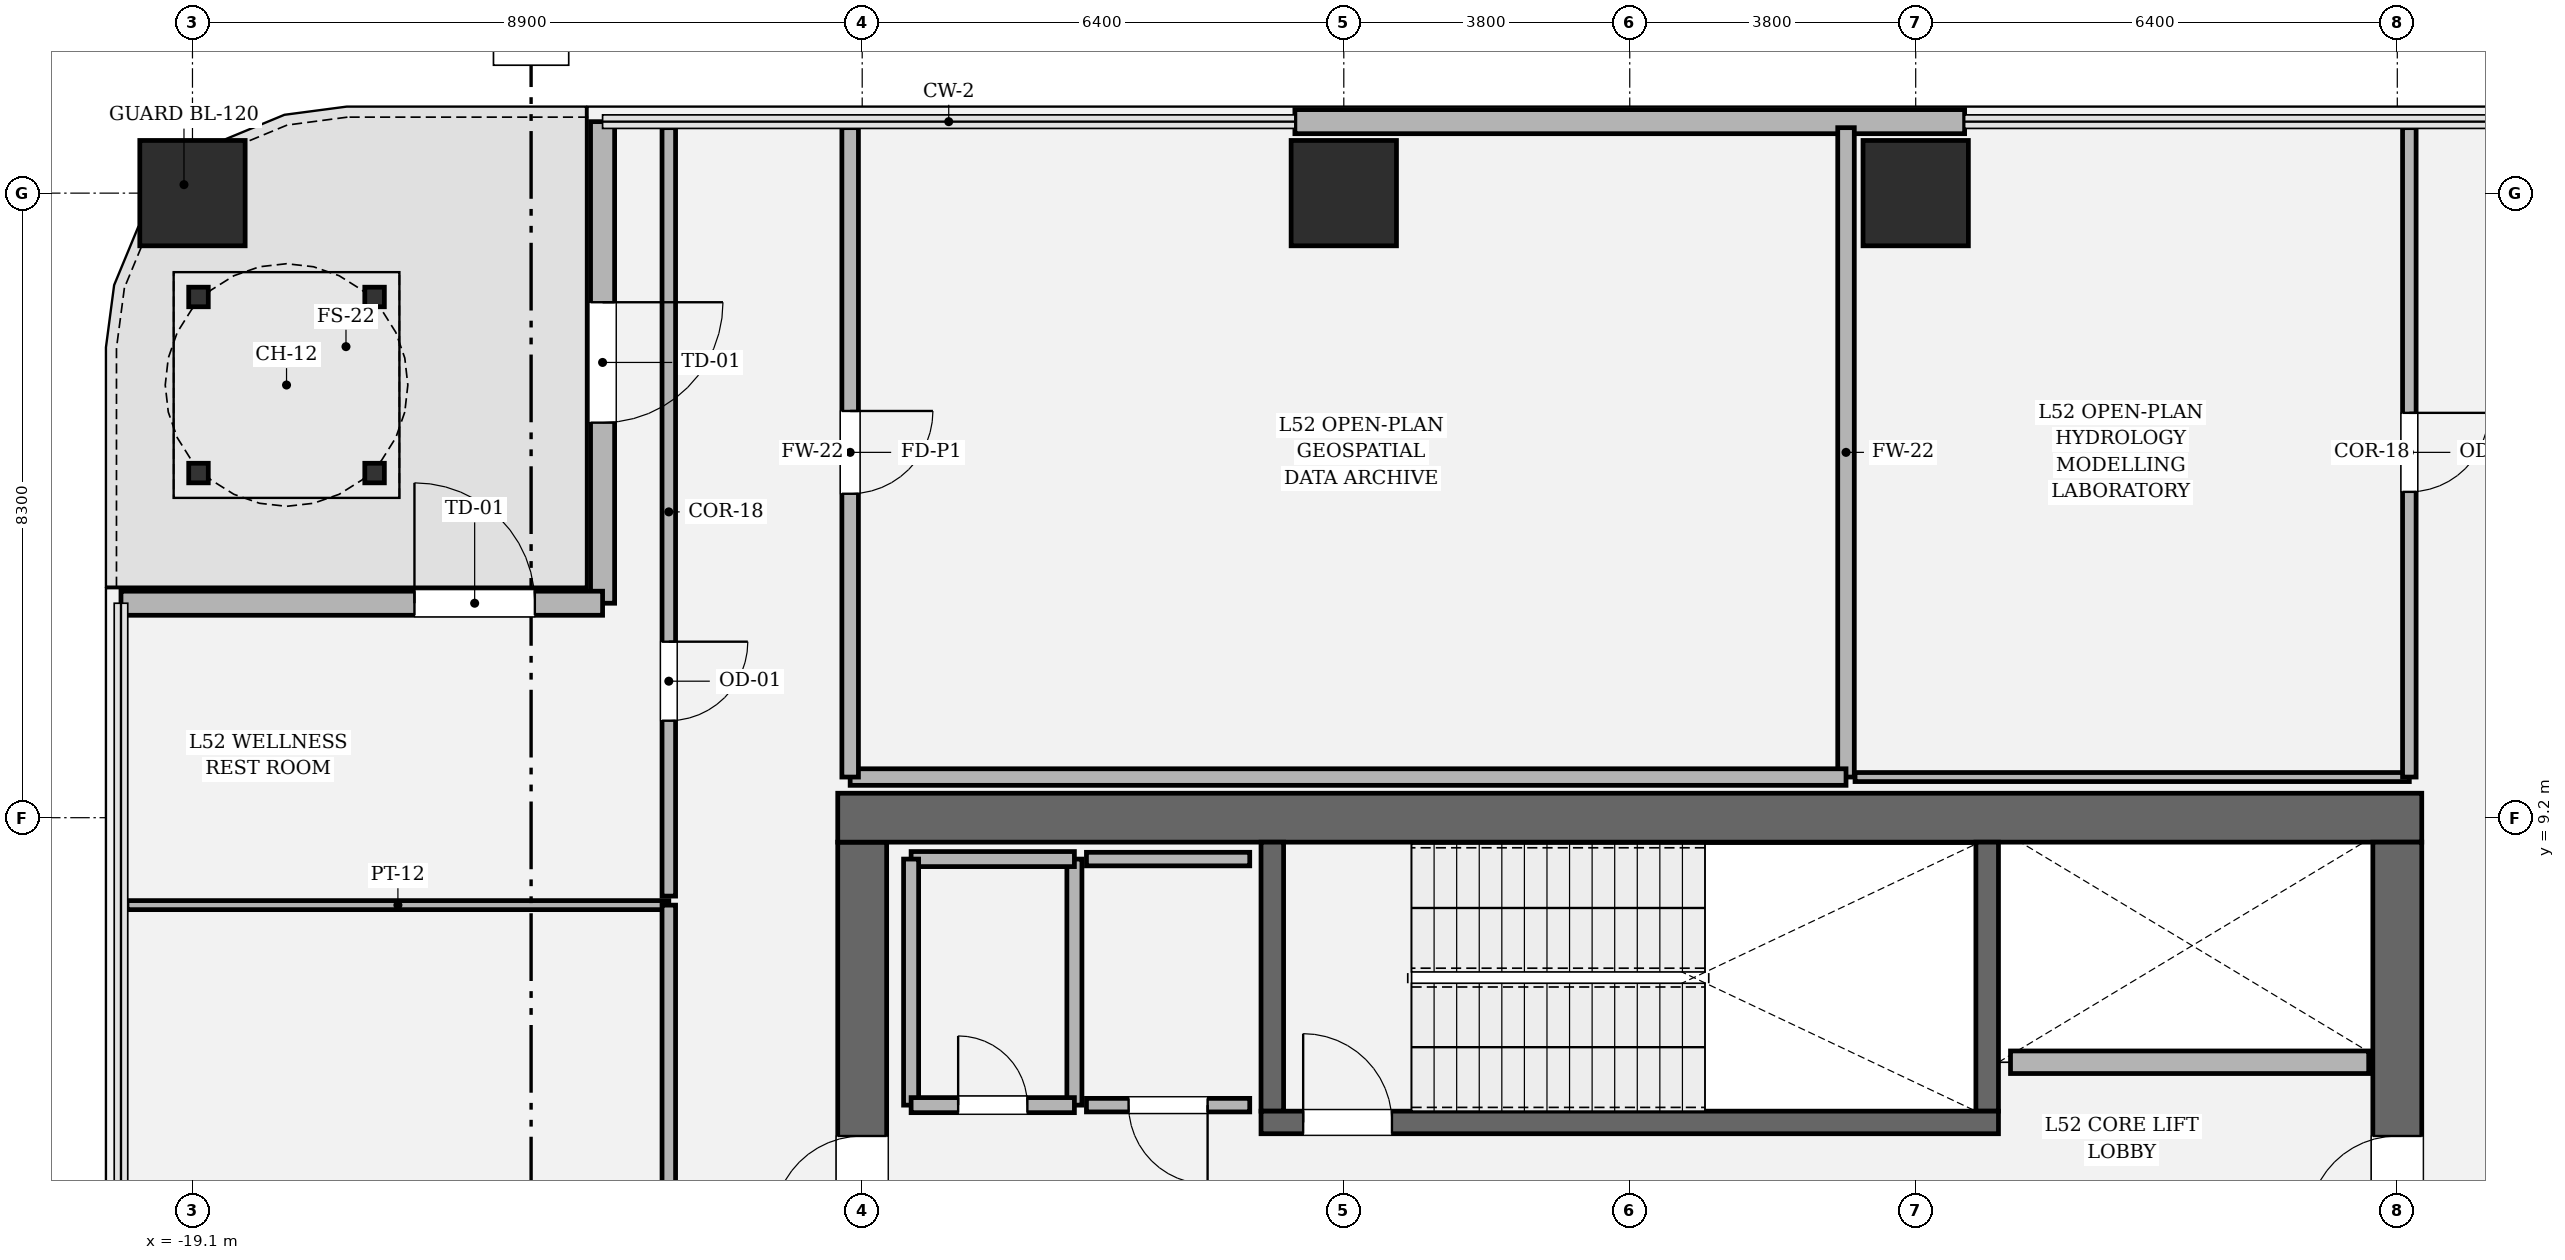
"""IFC4 building model, lengths in metres.
Left out: names, types, materials, properties, quantities, classifications, styles, units other than length and angle.
Written with IfcOpenShell. Run it as: python <this file> out.ifc"""

import sys

from ifc_helpers import new_model, si_unit, direction, frame, frame_2d, origin, origin_2d, place, context, subcontext, project, spatial, rectangle, hollow_rectangle, extrude, element, fill, save


model = new_model("IFC4")
c1 = context("Model", 3, precision=1e-05, world=origin(), true_north=direction((0.0, 1.0)))
c2 = subcontext(c1, "Body", "Model", "MODEL_VIEW")
j1 = project(units=[si_unit("LENGTHUNIT", "METRE"), si_unit("PLANEANGLEUNIT", "RADIAN")], contexts=[c1])
p1 = place(None, origin())
s1 = spatial("IfcSite", under=j1, at=p1, CompositionType="ELEMENT")
p2 = place(p1, origin())
s2 = spatial("IfcBuilding", under=s1, at=p2, CompositionType="ELEMENT")
p3 = place(p2, frame((0.0, 0.0, 220.8)))
s3 = spatial("IfcBuildingStorey", under=s2, at=p3, CompositionType="ELEMENT", Elevation=220.8)
p4 = place(p3, frame((-10.2, -8.875, 0.0), z_axis=(0.0, 0.0, 1.0), x_axis=(0.0, 1.0, 0.0)))
e1 = element("IfcWall", 1, at=p4, inside=s3, PredefinedType="SHEAR", context=c2, shape_type="SweptSolid", body=[
    extrude(rectangle(XDim=17.75, YDim=0.65, at=frame_2d((8.875, 0.0))), origin(), (0.0, 0.0, 1.0), 4.05),
])
p5 = place(p4, frame((12.665, 0.0, 0.0)))
e2 = element("IfcOpeningElement", 2, at=p5, cuts=e1, PredefinedType="OPENING", context=c2, shape_type="SweptSolid", body=[
    extrude(rectangle(XDim=1.18, YDim=2.2, at=frame_2d((0.59, 1.1))), frame((0.0, 0.335, 0.0), z_axis=(0.0, -1.0, 0.0), x_axis=(1.0, 0.0, 0.0)), (0.0, 0.0, 1.0), 0.67),
])
p6 = place(p3, frame((-10.525, 9.2, 0.0), z_axis=(0.0, 0.0, 1.0), x_axis=(1.0, 0.0, 0.0)))
e3 = element("IfcWall", 3, at=p6, inside=s3, PredefinedType="SHEAR", context=c2, shape_type="SweptSolid", body=[
    extrude(rectangle(XDim=21.05, YDim=0.65, at=frame_2d((10.525, 0.0))), origin(), (0.0, 0.0, 1.0), 4.05),
])
p7 = place(p3, frame((10.2, 8.875, 0.0), z_axis=(0.0, 0.0, 1.0), x_axis=(0.0, -1.0, 0.0)))
e4 = element("IfcWall", 4, at=p7, inside=s3, PredefinedType="SHEAR", context=c2, shape_type="SweptSolid", body=[
    extrude(rectangle(XDim=17.75, YDim=0.65, at=frame_2d((8.875, 0.0))), origin(), (0.0, 0.0, 1.0), 4.05),
])
p8 = place(p7, frame((3.905, 0.0, 0.0)))
e5 = element("IfcOpeningElement", 5, at=p8, cuts=e4, PredefinedType="OPENING", context=c2, shape_type="SweptSolid", body=[
    extrude(rectangle(XDim=1.18, YDim=2.2, at=frame_2d((0.59, 1.1))), frame((0.0, 0.335, 0.0), z_axis=(0.0, -1.0, 0.0), x_axis=(1.0, 0.0, 0.0)), (0.0, 0.0, 1.0), 0.67),
])
for number, where, z_axis, x_axis in (
    (6, (-4.75, 5.3, 0.0), (0.0, 0.0, 1.0), (0.0, 1.0, 0.0)),
    (7, (4.75, 8.875, 0.0), (0.0, 0.0, 1.0), (0.0, -1.0, 0.0)),
):
    element("IfcWall", number, at=place(p3, frame(where, z_axis=z_axis, x_axis=x_axis)), inside=s3, PredefinedType="SOLIDWALL", context=c2, shape_type="SweptSolid", body=[
        extrude(rectangle(XDim=3.575, YDim=0.3, at=frame_2d((1.788, 0.0))), origin(), (0.0, 0.0, 1.0), 4.05),
    ])
p9 = place(p3, frame((-4.9, 5.15, 0.0), z_axis=(0.0, 0.0, 1.0), x_axis=(1.0, 0.0, 0.0)))
e8 = element("IfcWall", 8, at=p9, inside=s3, PredefinedType="SOLIDWALL", context=c2, shape_type="SweptSolid", body=[
    extrude(rectangle(XDim=9.8, YDim=0.3, at=frame_2d((4.9, 0.0))), origin(), (0.0, 0.0, 1.0), 4.05),
])
p10 = place(p9, frame((0.56, 0.0, 0.0)))
e9 = element("IfcOpeningElement", 9, at=p10, cuts=e8, PredefinedType="OPENING", context=c2, shape_type="SweptSolid", body=[
    extrude(rectangle(XDim=1.18, YDim=2.2, at=frame_2d((0.59, 1.1))), frame((0.0, 0.16, 0.0), z_axis=(0.0, -1.0, 0.0), x_axis=(1.0, 0.0, 0.0)), (0.0, 0.0, 1.0), 0.32),
])
for number, where, z_axis, x_axis in (
    (10, (3.8, 17.5, 0.0), (0.0, 0.0, 1.0), (1.0, 0.0, 0.0)),
    (11, (-3.8, 17.5, 0.0), (0.0, 0.0, 1.0), (1.0, 0.0, 0.0)),
    (12, (-19.1, 17.5, 0.0), (0.0, 0.0, 1.0), (1.0, 0.0, 0.0)),
):
    element("IfcColumn", number, at=place(p3, frame(where, z_axis=z_axis, x_axis=x_axis)), inside=s3, PredefinedType="COLUMN", context=c2, shape_type="SweptSolid", body=[
        extrude(hollow_rectangle(XDim=1.4, YDim=1.4, WallThickness=0.042, at=origin_2d()), origin(), (0.0, 0.0, 1.0), 4.05),
    ])
p11 = place(p3, frame((4.45, 18.45, 0.0), z_axis=(0.0, 0.0, 1.0), x_axis=(-1.0, 0.0, 0.0)))
e13 = element("IfcWall", 13, at=p11, inside=s3, PredefinedType="SOLIDWALL", context=c2, shape_type="SweptSolid", body=[
    extrude(rectangle(XDim=8.9, YDim=0.32, at=frame_2d((4.45, 0.0))), origin(), (0.0, 0.0, 1.0), 3.83),
])
p12 = place(p3, frame((-13.65, 18.45, 0.0), z_axis=(0.0, 0.0, 1.0), x_axis=(0.0, -1.0, 0.0)))
e14 = element("IfcWall", 14, at=p12, inside=s3, PredefinedType="SOLIDWALL", context=c2, shape_type="SweptSolid", body=[
    extrude(rectangle(XDim=6.4, YDim=0.32, at=frame_2d((3.2, 0.0))), origin(), (0.0, 0.0, 1.0), 3.174),
])
p13 = place(p12, frame((2.4, 0.0, 0.0)))
e15 = element("IfcOpeningElement", 15, at=p13, cuts=e14, PredefinedType="OPENING", context=c2, shape_type="SweptSolid", body=[
    extrude(rectangle(XDim=1.6, YDim=2.35, at=frame_2d((0.8, 1.175))), frame((0.0, 0.17, 0.0), z_axis=(0.0, -1.0, 0.0), x_axis=(1.0, 0.0, 0.0)), (0.0, 0.0, 1.0), 0.34),
])
p14 = place(p3, frame((-13.65, 12.05, 0.0), z_axis=(0.0, 0.0, 1.0), x_axis=(-1.0, 0.0, 0.0)))
e16 = element("IfcWall", 16, at=p14, inside=s3, PredefinedType="SOLIDWALL", context=c2, shape_type="SweptSolid", body=[
    extrude(rectangle(XDim=6.4, YDim=0.32, at=frame_2d((3.2, 0.0))), origin(), (0.0, 0.0, 1.0), 3.174),
])
p15 = place(p14, frame((0.9, 0.0, 0.0)))
e17 = element("IfcOpeningElement", 17, at=p15, cuts=e16, PredefinedType="OPENING", context=c2, shape_type="SweptSolid", body=[
    extrude(rectangle(XDim=1.6, YDim=2.35, at=frame_2d((0.8, 1.175))), frame((0.0, 0.17, 0.0), z_axis=(0.0, -1.0, 0.0), x_axis=(1.0, 0.0, 0.0)), (0.0, 0.0, 1.0), 0.34),
])
p16 = place(p3, frame((5.06, 5.95, 0.0), z_axis=(0.0, 0.0, 1.0), x_axis=(1.0, 0.0, 0.0)))
e18 = element("IfcWall", 18, at=p16, inside=s3, PredefinedType="SOLIDWALL", context=c2, shape_type="SweptSolid", body=[
    extrude(rectangle(XDim=4.76, YDim=0.3, at=frame_2d((2.38, 0.0))), origin(), (0.0, 0.0, 1.0), 3.83),
])
p17 = place(p3, frame((-7.38, 5.38, 0.0), z_axis=(0.0, 0.0, 1.0), x_axis=(0.0, 1.0, 0.0)))
e19 = element("IfcWall", 19, at=p17, inside=s3, PredefinedType="SOLIDWALL", context=c2, shape_type="SweptSolid", body=[
    extrude(rectangle(XDim=3.27, YDim=0.2, at=frame_2d((1.635, 0.0))), origin(), (0.0, 0.0, 1.0), 3.83),
])
p18 = place(p3, frame((-7.38, 8.65, 0.0), z_axis=(0.0, 0.0, 1.0), x_axis=(-1.0, 0.0, 0.0)))
e20 = element("IfcWall", 20, at=p18, inside=s3, PredefinedType="SOLIDWALL", context=c2, shape_type="SweptSolid", body=[
    extrude(rectangle(XDim=2.17, YDim=0.2, at=frame_2d((1.085, 0.0))), origin(), (0.0, 0.0, 1.0), 3.83),
])
p19 = place(p3, frame((-9.55, 8.65, 0.0), z_axis=(0.0, 0.0, 1.0), x_axis=(0.0, -1.0, 0.0)))
e21 = element("IfcWall", 21, at=p19, inside=s3, PredefinedType="SOLIDWALL", context=c2, shape_type="SweptSolid", body=[
    extrude(rectangle(XDim=3.27, YDim=0.2, at=frame_2d((1.635, 0.0))), origin(), (0.0, 0.0, 1.0), 3.83),
])
p20 = place(p3, frame((-9.55, 5.38, 0.0), z_axis=(0.0, 0.0, 1.0), x_axis=(1.0, 0.0, 0.0)))
e22 = element("IfcWall", 22, at=p20, inside=s3, PredefinedType="SOLIDWALL", context=c2, shape_type="SweptSolid", body=[
    extrude(rectangle(XDim=2.17, YDim=0.2, at=frame_2d((1.085, 0.0))), origin(), (0.0, 0.0, 1.0), 3.83),
])
p21 = place(p20, frame((0.625, 0.0, 0.0)))
e23 = element("IfcOpeningElement", 23, at=p21, cuts=e22, PredefinedType="OPENING", context=c2, shape_type="SweptSolid", body=[
    extrude(rectangle(XDim=0.92, YDim=2.1, at=frame_2d((0.46, 1.05))), frame((0.0, 0.11, 0.0), z_axis=(0.0, -1.0, 0.0), x_axis=(1.0, 0.0, 0.0)), (0.0, 0.0, 1.0), 0.22),
])
p22 = place(p3, frame((-5.05, 8.65, 0.0), z_axis=(0.0, 0.0, 1.0), x_axis=(-1.0, 0.0, 0.0)))
e24 = element("IfcWall", 24, at=p22, inside=s3, PredefinedType="PARTITIONING", context=c2, shape_type="SweptSolid", body=[
    extrude(rectangle(XDim=2.17, YDim=0.18, at=frame_2d((1.085, 0.0))), origin(), (0.0, 0.0, 1.0), 3.83),
])
p23 = place(p3, frame((-7.22, 5.38, 0.0), z_axis=(0.0, 0.0, 1.0), x_axis=(1.0, 0.0, 0.0)))
e25 = element("IfcWall", 25, at=p23, inside=s3, PredefinedType="PARTITIONING", context=c2, shape_type="SweptSolid", body=[
    extrude(rectangle(XDim=2.17, YDim=0.18, at=frame_2d((1.085, 0.0))), origin(), (0.0, 0.0, 1.0), 3.83),
])
p24 = place(p23, frame((0.56, 0.0, 0.0)))
e26 = element("IfcOpeningElement", 26, at=p24, cuts=e25, PredefinedType="OPENING", context=c2, shape_type="SweptSolid", body=[
    extrude(rectangle(XDim=1.05, YDim=2.2, at=frame_2d((0.525, 1.1))), frame((0.0, 0.1, 0.0), z_axis=(0.0, -1.0, 0.0), x_axis=(1.0, 0.0, 0.0)), (0.0, 0.0, 1.0), 0.2),
])
p25 = place(p3, frame((-19.97, 8.038, 0.0), z_axis=(0.0, 0.0, 1.0), x_axis=(1.0, 0.0, 0.0)))
e27 = element("IfcWall", 27, at=p25, inside=s3, PredefinedType="PARTITIONING", context=c2, shape_type="SweptSolid", body=[
    extrude(rectangle(XDim=7.2, YDim=0.12, at=frame_2d((3.6, 0.0))), origin(), (0.0, 0.0, 1.0), 3.174),
])
p26 = place(p3, frame((-12.77, 8.038, 0.0), z_axis=(0.0, 0.0, 1.0), x_axis=(0.0, -1.0, 0.0)))
e28 = element("IfcWall", 28, at=p26, inside=s3, PredefinedType="PARTITIONING", context=c2, shape_type="SweptSolid", body=[
    extrude(rectangle(XDim=14.638, YDim=0.18, at=frame_2d((7.319, 0.0))), origin(), (0.0, 0.0, 1.0), 3.174),
])
p27 = place(p3, frame((-12.77, 18.37, 0.0), z_axis=(0.0, 0.0, 1.0), x_axis=(0.0, -1.0, 0.0)))
e29 = element("IfcWall", 29, at=p27, inside=s3, PredefinedType="PARTITIONING", context=c2, shape_type="SweptSolid", body=[
    extrude(rectangle(XDim=10.212, YDim=0.18, at=frame_2d((5.106, 0.0))), origin(), (0.0, 0.0, 1.0), 3.174),
])
p28 = place(p27, frame((6.831, 0.0, 0.0)))
e30 = element("IfcOpeningElement", 30, at=p28, cuts=e29, PredefinedType="OPENING", context=c2, shape_type="SweptSolid", body=[
    extrude(rectangle(XDim=1.05, YDim=2.2, at=frame_2d((0.525, 1.1))), frame((0.0, 0.1, 0.0), z_axis=(0.0, -1.0, 0.0), x_axis=(1.0, 0.0, 0.0)), (0.0, 0.0, 1.0), 0.2),
])
p29 = place(p3, frame((2.874, 18.37, 0.0), z_axis=(0.0, 0.0, 1.0), x_axis=(0.0, -1.0, 0.0)))
e31 = element("IfcWall", 31, at=p29, inside=s3, PredefinedType="SOLIDWALL", context=c2, shape_type="SweptSolid", body=[
    extrude(rectangle(XDim=8.63, YDim=0.22, at=frame_2d((4.315, 0.0))), origin(), (0.0, 0.0, 1.0), 3.174),
])
p30 = place(p3, frame((2.874, 9.74, 0.0), z_axis=(0.0, 0.0, 1.0), x_axis=(-1.0, 0.0, 0.0)))
e32 = element("IfcWall", 32, at=p30, inside=s3, PredefinedType="SOLIDWALL", context=c2, shape_type="SweptSolid", body=[
    extrude(rectangle(XDim=13.234, YDim=0.22, at=frame_2d((6.617, 0.0))), origin(), (0.0, 0.0, 1.0), 3.174),
])
p31 = place(p3, frame((-10.36, 9.74, 0.0), z_axis=(0.0, 0.0, 1.0), x_axis=(0.0, 1.0, 0.0)))
e33 = element("IfcWall", 33, at=p31, inside=s3, PredefinedType="SOLIDWALL", context=c2, shape_type="SweptSolid", body=[
    extrude(rectangle(XDim=8.63, YDim=0.22, at=frame_2d((4.315, 0.0))), origin(), (0.0, 0.0, 1.0), 3.174),
])
p32 = place(p31, frame((3.765, 0.0, 0.0)))
e34 = element("IfcOpeningElement", 34, at=p32, cuts=e33, PredefinedType="OPENING", context=c2, shape_type="SweptSolid", body=[
    extrude(rectangle(XDim=1.1, YDim=2.2, at=frame_2d((0.55, 1.1))), frame((0.0, 0.12, 0.0), z_axis=(0.0, -1.0, 0.0), x_axis=(1.0, 0.0, 0.0)), (0.0, 0.0, 1.0), 0.24),
])
p33 = place(p3, frame((10.36, 9.74, 0.0), z_axis=(0.0, 0.0, 1.0), x_axis=(-1.0, 0.0, 0.0)))
e35 = element("IfcWall", 35, at=p33, inside=s3, PredefinedType="PARTITIONING", context=c2, shape_type="SweptSolid", body=[
    extrude(rectangle(XDim=7.366, YDim=0.12, at=frame_2d((3.683, 0.0))), origin(), (0.0, 0.0, 1.0), 3.174),
])
p34 = place(p3, frame((10.36, 18.37, 0.0), z_axis=(0.0, 0.0, 1.0), x_axis=(0.0, -1.0, 0.0)))
e36 = element("IfcWall", 36, at=p34, inside=s3, PredefinedType="PARTITIONING", context=c2, shape_type="SweptSolid", body=[
    extrude(rectangle(XDim=8.63, YDim=0.18, at=frame_2d((4.315, 0.0))), origin(), (0.0, 0.0, 1.0), 3.174),
])
p35 = place(p34, frame((3.79, 0.0, 0.0)))
e37 = element("IfcOpeningElement", 37, at=p35, cuts=e36, PredefinedType="OPENING", context=c2, shape_type="SweptSolid", body=[
    extrude(rectangle(XDim=1.05, YDim=2.2, at=frame_2d((0.525, 1.1))), frame((0.0, 0.1, 0.0), z_axis=(0.0, -1.0, 0.0), x_axis=(1.0, 0.0, 0.0)), (0.0, 0.0, 1.0), 0.2),
])
p36 = place(p13, origin())
e38 = element("IfcDoor", 38, at=p36, inside=s3, OperationType="SINGLE_SWING_LEFT", PredefinedType="DOOR", context=c2, shape_type="SweptSolid", body=[
    extrude(rectangle(XDim=1.6, YDim=2.35, at=frame_2d((0.8, 1.175))), frame((0.0, 0.025, 0.0), z_axis=(0.0, -1.0, 0.0), x_axis=(1.0, 0.0, 0.0)), (0.0, 0.0, 1.0), 0.05),
])
fill(e15, e38)
p37 = place(p15, origin())
e39 = element("IfcDoor", 39, at=p37, inside=s3, OperationType="SINGLE_SWING_RIGHT", PredefinedType="DOOR", context=c2, shape_type="SweptSolid", body=[
    extrude(rectangle(XDim=1.6, YDim=2.35, at=frame_2d((0.8, 1.175))), frame((0.0, 0.025, 0.0), z_axis=(0.0, -1.0, 0.0), x_axis=(1.0, 0.0, 0.0)), (0.0, 0.0, 1.0), 0.05),
])
fill(e17, e39)
p38 = place(p10, origin())
e40 = element("IfcDoor", 40, at=p38, inside=s3, OperationType="SINGLE_SWING_LEFT", PredefinedType="DOOR", context=c2, shape_type="SweptSolid", body=[
    extrude(rectangle(XDim=1.18, YDim=2.2, at=frame_2d((0.59, 1.1))), frame((0.0, 0.025, 0.0), z_axis=(0.0, -1.0, 0.0), x_axis=(1.0, 0.0, 0.0)), (0.0, 0.0, 1.0), 0.05),
])
fill(e9, e40)
p39 = place(p5, origin())
e41 = element("IfcDoor", 41, at=p39, inside=s3, OperationType="SINGLE_SWING_LEFT", PredefinedType="DOOR", context=c2, shape_type="SweptSolid", body=[
    extrude(rectangle(XDim=1.18, YDim=2.2, at=frame_2d((0.59, 1.1))), frame((0.0, 0.025, 0.0), z_axis=(0.0, -1.0, 0.0), x_axis=(1.0, 0.0, 0.0)), (0.0, 0.0, 1.0), 0.05),
])
fill(e2, e41)
p40 = place(p8, origin())
e42 = element("IfcDoor", 42, at=p40, inside=s3, OperationType="SINGLE_SWING_RIGHT", PredefinedType="DOOR", context=c2, shape_type="SweptSolid", body=[
    extrude(rectangle(XDim=1.18, YDim=2.2, at=frame_2d((0.59, 1.1))), frame((0.0, 0.025, 0.0), z_axis=(0.0, -1.0, 0.0), x_axis=(1.0, 0.0, 0.0)), (0.0, 0.0, 1.0), 0.05),
])
fill(e5, e42)
p41 = place(p21, origin())
e43 = element("IfcDoor", 43, at=p41, inside=s3, OperationType="SINGLE_SWING_LEFT", PredefinedType="DOOR", context=c2, shape_type="SweptSolid", body=[
    extrude(rectangle(XDim=0.92, YDim=2.1, at=frame_2d((0.46, 1.05))), frame((0.0, 0.025, 0.0), z_axis=(0.0, -1.0, 0.0), x_axis=(1.0, 0.0, 0.0)), (0.0, 0.0, 1.0), 0.05),
])
fill(e23, e43)
p42 = place(p24, origin())
e44 = element("IfcDoor", 44, at=p42, inside=s3, OperationType="SINGLE_SWING_RIGHT", PredefinedType="DOOR", context=c2, shape_type="SweptSolid", body=[
    extrude(rectangle(XDim=1.05, YDim=2.2, at=frame_2d((0.525, 1.1))), frame((0.0, 0.025, 0.0), z_axis=(0.0, -1.0, 0.0), x_axis=(1.0, 0.0, 0.0)), (0.0, 0.0, 1.0), 0.05),
])
fill(e26, e44)
p43 = place(p28, origin())
e45 = element("IfcDoor", 45, at=p43, inside=s3, OperationType="SINGLE_SWING_LEFT", PredefinedType="DOOR", context=c2, shape_type="SweptSolid", body=[
    extrude(rectangle(XDim=1.05, YDim=2.2, at=frame_2d((0.525, 1.1))), frame((0.0, 0.025, 0.0), z_axis=(0.0, -1.0, 0.0), x_axis=(1.0, 0.0, 0.0)), (0.0, 0.0, 1.0), 0.05),
])
fill(e30, e45)
p44 = place(p32, origin())
e46 = element("IfcDoor", 46, at=p44, inside=s3, OperationType="SINGLE_SWING_RIGHT", PredefinedType="DOOR", context=c2, shape_type="SweptSolid", body=[
    extrude(rectangle(XDim=1.1, YDim=2.2, at=frame_2d((0.55, 1.1))), frame((0.0, 0.025, 0.0), z_axis=(0.0, -1.0, 0.0), x_axis=(1.0, 0.0, 0.0)), (0.0, 0.0, 1.0), 0.05),
])
fill(e34, e46)
p45 = place(p35, origin())
e47 = element("IfcDoor", 47, at=p45, inside=s3, OperationType="SINGLE_SWING_LEFT", PredefinedType="DOOR", context=c2, shape_type="SweptSolid", body=[
    extrude(rectangle(XDim=1.05, YDim=2.2, at=frame_2d((0.525, 1.1))), frame((0.0, 0.025, 0.0), z_axis=(0.0, -1.0, 0.0), x_axis=(1.0, 0.0, 0.0)), (0.0, 0.0, 1.0), 0.05),
])
fill(e37, e47)
save(model, sys.argv[1])
